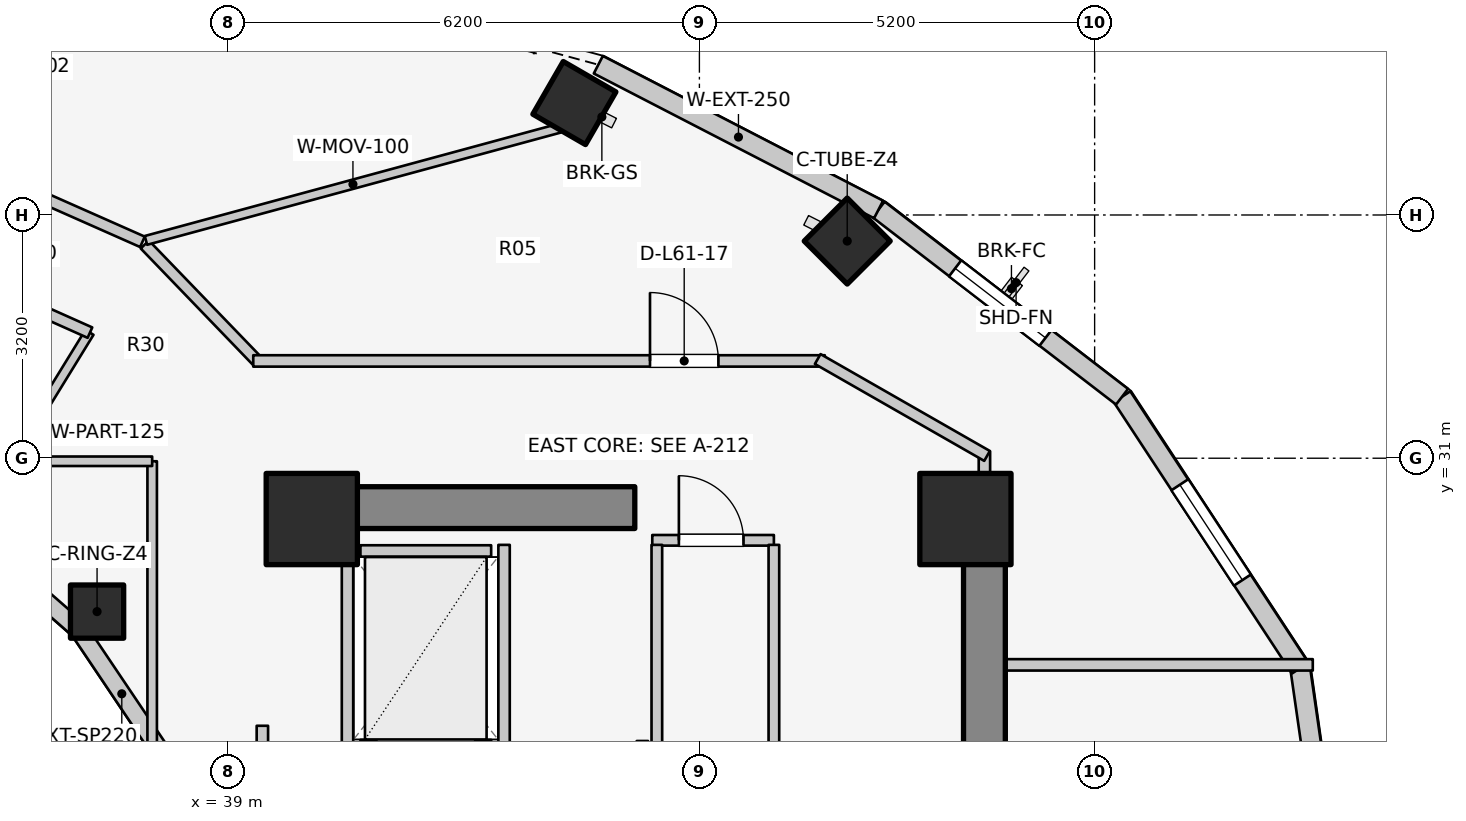
"""IFC4 building model, lengths in metres.
Left out: names, types, materials, properties, quantities, classifications, styles, units other than length and angle.
Written with IfcOpenShell. Run it as: python <this file> out.ifc"""

import sys

from ifc_helpers import new_model, si_unit, direction, frame, frame_2d, origin, origin_2d, place, context, subcontext, project, spatial, rectangle, extrude, element, fill, save


model = new_model("IFC4")
c1 = context("Model", 3, precision=1e-05, world=origin(), true_north=direction((0.0, 1.0)))
c2 = subcontext(c1, "Body", "Model", "MODEL_VIEW")
j1 = project(units=[si_unit("LENGTHUNIT", "METRE"), si_unit("PLANEANGLEUNIT", "RADIAN")], contexts=[c1])
p1 = place(None, origin())
s1 = spatial("IfcSite", under=j1, at=p1, CompositionType="ELEMENT")
p2 = place(p1, origin())
s2 = spatial("IfcBuilding", under=s1, at=p2, CompositionType="ELEMENT")
p3 = place(p2, frame((0.0, 0.0, 201.6)))
s3 = spatial("IfcBuildingStorey", under=s2, at=p3, CompositionType="ELEMENT", Elevation=201.6)
p4 = place(p3, frame((48.95, 17.05, 0.0), z_axis=(0.0, 0.0, 1.0), x_axis=(0.0, 1.0, 0.0)))
e1 = element("IfcWall", 1, at=p4, inside=s3, PredefinedType="SHEAR", context=c2, shape_type="SweptSolid", body=[
    extrude(rectangle(XDim=12.8, YDim=0.55, at=frame_2d((6.4, 0.0))), origin(), (0.0, 0.0, 1.0), 3.1),
])
p5 = place(p3, frame((39.85, 30.35, 0.0), z_axis=(0.0, 0.0, 1.0), x_axis=(1.0, 0.0, 0.0)))
e2 = element("IfcWall", 2, at=p5, inside=s3, PredefinedType="SHEAR", context=c2, shape_type="SweptSolid", body=[
    extrude(rectangle(XDim=4.5, YDim=0.55, at=frame_2d((2.25, 0.0))), origin(), (0.0, 0.0, 1.0), 3.1),
])
for number, where, z_axis, x_axis in (
    (3, (48.7, 30.2, 0.0), (0.0, 0.0, 1.0), (1.0, 0.0, 0.0)),
    (4, (40.1, 30.2, 0.0), (0.0, 0.0, 1.0), (1.0, 0.0, 0.0)),
):
    element("IfcColumn", number, at=place(p3, frame(where, z_axis=z_axis, x_axis=x_axis)), inside=s3, PredefinedType="COLUMN", context=c2, shape_type="SweptSolid", body=[
        extrude(rectangle(XDim=1.2, YDim=1.2, at=origin_2d()), origin(), (0.0, 0.0, 1.0), 3.1),
    ])
p6 = place(p3, frame((37.275, 28.982, 0.0), z_axis=(0.0, 0.0, 1.0), x_axis=(1.0, 0.0, 0.0)))
e5 = element("IfcColumn", 5, at=p6, inside=s3, PredefinedType="COLUMN", context=c2, shape_type="SweptSolid", body=[
    extrude(rectangle(XDim=0.7, YDim=0.7, at=origin_2d()), origin(), (0.0, 0.0, 1.0), 3.1),
])
for number, where, z_axis, x_axis in (
    (6, (47.145, 33.857, 0.0), (0.0, 0.0, 1.0), (0.707, 0.707, 0.0)),
    (7, (43.555, 35.673, 0.0), (0.0, 0.0, 1.0), (0.5, 0.866, 0.0)),
):
    element("IfcColumn", number, at=place(p3, frame(where, z_axis=z_axis, x_axis=x_axis)), inside=s3, PredefinedType="COLUMN", context=c2, shape_type="SweptSolid", body=[
        extrude(rectangle(XDim=0.8, YDim=0.8, at=origin_2d()), origin(), (0.0, 0.0, 1.0), 3.1),
    ])
p7 = place(p3, frame((38.166, 27.06, 0.0), z_axis=(0.0, 0.0, 1.0), x_axis=(-0.558197800898, 0.829707909492, 0.0)))
e8 = element("IfcWall", 8, at=p7, inside=s3, PredefinedType="STANDARD", context=c2, shape_type="SweptSolid", body=[
    extrude(rectangle(XDim=2.027, YDim=0.23, at=frame_2d((1.013, 0.0))), origin(), (0.0, 0.0, 1.0), 2.16),
])
p8 = place(p3, frame((37.035, 28.742, 0.0), z_axis=(0.0, 0.0, 1.0), x_axis=(-0.752576694707, 0.658504607869, 0.0)))
e9 = element("IfcWall", 9, at=p8, inside=s3, PredefinedType="STANDARD", context=c2, shape_type="SweptSolid", body=[
    extrude(rectangle(XDim=1.959, YDim=0.23, at=frame_2d((0.98, 0.0))), origin(), (0.0, 0.0, 1.0), 2.16),
])
p9 = place(p3, frame((53.86, 23.0, 0.0), z_axis=(0.0, 0.0, 1.0), x_axis=(-0.142712754019, 0.989764148593, 0.0)))
e10 = element("IfcWall", 10, at=p9, inside=s3, PredefinedType="STANDARD", context=c2, shape_type="SweptSolid", body=[
    extrude(rectangle(XDim=5.293, YDim=0.26, at=frame_2d((2.646, 0.0))), origin(), (0.0, 0.0, 1.0), 2.85),
])
p10 = place(p9, frame((1.896, 0.0, 0.75)))
e11 = element("IfcOpeningElement", 11, at=p10, cuts=e10, PredefinedType="OPENING", context=c2, shape_type="SweptSolid", body=[
    extrude(rectangle(XDim=1.5, YDim=1.6, at=frame_2d((0.75, 0.8))), frame((0.0, 0.14, 0.0), z_axis=(0.0, -1.0, 0.0), x_axis=(1.0, 0.0, 0.0)), (0.0, 0.0, 1.0), 0.28),
])
p11 = place(p3, frame((53.105, 28.239, 0.0), z_axis=(0.0, 0.0, 1.0), x_axis=(-0.548776305075, 0.835969238064, 0.0)))
e12 = element("IfcWall", 12, at=p11, inside=s3, PredefinedType="STANDARD", context=c2, shape_type="SweptSolid", body=[
    extrude(rectangle(XDim=4.271, YDim=0.26, at=frame_2d((2.135, 0.0))), origin(), (0.0, 0.0, 1.0), 2.85),
])
p12 = place(p11, frame((1.385, 0.0, 0.75)))
e13 = element("IfcOpeningElement", 13, at=p12, cuts=e12, PredefinedType="OPENING", context=c2, shape_type="SweptSolid", body=[
    extrude(rectangle(XDim=1.5, YDim=1.6, at=frame_2d((0.75, 0.8))), frame((0.0, 0.14, 0.0), z_axis=(0.0, -1.0, 0.0), x_axis=(1.0, 0.0, 0.0)), (0.0, 0.0, 1.0), 0.28),
])
p13 = place(p3, frame((50.761, 31.809, 0.0), z_axis=(0.0, 0.0, 1.0), x_axis=(-0.792713817907, 0.609593965603, 0.0)))
e14 = element("IfcWall", 14, at=p13, inside=s3, PredefinedType="STANDARD", context=c2, shape_type="SweptSolid", body=[
    extrude(rectangle(XDim=4.041, YDim=0.26, at=frame_2d((2.021, 0.0))), origin(), (0.0, 0.0, 1.0), 2.85),
])
p14 = place(p13, frame((1.271, 0.0, 0.75)))
e15 = element("IfcOpeningElement", 15, at=p14, cuts=e14, PredefinedType="OPENING", context=c2, shape_type="SweptSolid", body=[
    extrude(rectangle(XDim=1.5, YDim=1.6, at=frame_2d((0.75, 0.8))), frame((0.0, 0.14, 0.0), z_axis=(0.0, -1.0, 0.0), x_axis=(1.0, 0.0, 0.0)), (0.0, 0.0, 1.0), 0.28),
])
p15 = place(p3, frame((47.558, 34.272, 0.0), z_axis=(0.0, 0.0, 1.0), x_axis=(-0.88849146803, 0.458893137057, 0.0)))
e16 = element("IfcWall", 16, at=p15, inside=s3, PredefinedType="STANDARD", context=c2, shape_type="SweptSolid", body=[
    extrude(rectangle(XDim=4.15, YDim=0.26, at=frame_2d((2.075, 0.0))), origin(), (0.0, 0.0, 1.0), 2.85),
])
p16 = place(p3, frame((40.74, 27.22, 0.0), z_axis=(0.0, 0.0, 1.0), x_axis=(1.0, 0.0, 0.0)))
e17 = element("IfcWall", 17, at=p16, inside=s3, PredefinedType="SOLIDWALL", context=c2, shape_type="SweptSolid", body=[
    extrude(rectangle(XDim=1.72, YDim=0.15, at=frame_2d((0.86, 0.0))), origin(), (0.0, 0.0, 1.0), 2.855),
])
p17 = place(p16, frame((0.21, 0.0, 0.0)))
e18 = element("IfcOpeningElement", 18, at=p17, cuts=e17, PredefinedType="OPENING", context=c2, shape_type="SweptSolid", body=[
    extrude(rectangle(XDim=1.3, YDim=2.1, at=frame_2d((0.65, 1.05))), frame((0.0, 0.085, 0.0), z_axis=(0.0, -1.0, 0.0), x_axis=(1.0, 0.0, 0.0)), (0.0, 0.0, 1.0), 0.17),
])
p18 = place(p3, frame((40.74, 29.78, 0.0), z_axis=(0.0, 0.0, 1.0), x_axis=(1.0, 0.0, 0.0)))
e19 = element("IfcWall", 19, at=p18, inside=s3, PredefinedType="SOLIDWALL", context=c2, shape_type="SweptSolid", body=[
    extrude(rectangle(XDim=1.72, YDim=0.15, at=frame_2d((0.86, 0.0))), origin(), (0.0, 0.0, 1.0), 2.855),
])
for number, where, z_axis, x_axis in (
    (20, (40.57, 27.14, 0.0), (0.0, 0.0, 1.0), (0.0, 1.0, 0.0)),
    (21, (42.63, 27.14, 0.0), (0.0, 0.0, 1.0), (0.0, 1.0, 0.0)),
):
    element("IfcWall", number, at=place(p3, frame(where, z_axis=z_axis, x_axis=x_axis)), inside=s3, PredefinedType="SOLIDWALL", context=c2, shape_type="SweptSolid", body=[
        extrude(rectangle(XDim=2.72, YDim=0.15, at=frame_2d((1.36, 0.0))), origin(), (0.0, 0.0, 1.0), 2.855),
    ])
p19 = place(p3, frame((39.45, 24.08, 0.0), z_axis=(0.0, 0.0, 1.0), x_axis=(0.0, 1.0, 0.0)))
e22 = element("IfcWall", 22, at=p19, inside=s3, PredefinedType="PARTITIONING", context=c2, shape_type="SweptSolid", body=[
    extrude(rectangle(XDim=3.4, YDim=0.15, at=frame_2d((1.7, 0.0))), origin(), (0.0, 0.0, 1.0), 2.855),
])
p20 = place(p19, frame((2.02, 0.0, 0.0)))
e23 = element("IfcOpeningElement", 23, at=p20, cuts=e22, PredefinedType="OPENING", context=c2, shape_type="SweptSolid", body=[
    extrude(rectangle(XDim=1.1, YDim=2.1, at=frame_2d((0.55, 1.05))), frame((0.0, 0.085, 0.0), z_axis=(0.0, -1.0, 0.0), x_axis=(1.0, 0.0, 0.0)), (0.0, 0.0, 1.0), 0.17),
])
p21 = place(p3, frame((44.58, 29.92, 0.0), z_axis=(0.0, 0.0, 1.0), x_axis=(1.0, 0.0, 0.0)))
e24 = element("IfcWall", 24, at=p21, inside=s3, PredefinedType="PLUMBINGWALL", context=c2, shape_type="SweptSolid", body=[
    extrude(rectangle(XDim=1.6, YDim=0.14, at=frame_2d((0.8, 0.0))), origin(), (0.0, 0.0, 1.0), 2.855),
])
p22 = place(p21, frame((0.35, 0.0, 0.0)))
e25 = element("IfcOpeningElement", 25, at=p22, cuts=e24, PredefinedType="OPENING", context=c2, shape_type="SweptSolid", body=[
    extrude(rectangle(XDim=0.85, YDim=2.05, at=frame_2d((0.425, 1.025))), frame((0.0, 0.08, 0.0), z_axis=(0.0, -1.0, 0.0), x_axis=(1.0, 0.0, 0.0)), (0.0, 0.0, 1.0), 0.16),
])
for number, where, z_axis, x_axis in (
    (26, (44.64, 25.98, 0.0), (0.0, 0.0, 1.0), (0.0, 1.0, 0.0)),
    (27, (46.18, 25.98, 0.0), (0.0, 0.0, 1.0), (0.0, 1.0, 0.0)),
):
    element("IfcWall", number, at=place(p3, frame(where, z_axis=z_axis, x_axis=x_axis)), inside=s3, PredefinedType="PLUMBINGWALL", context=c2, shape_type="SweptSolid", body=[
        extrude(rectangle(XDim=3.88, YDim=0.14, at=frame_2d((1.94, 0.0))), origin(), (0.0, 0.0, 1.0), 2.855),
    ])
p23 = place(p3, frame((35.55, 30.015, 0.0), z_axis=(0.0, 0.0, 1.0), x_axis=(0.523992004803, 0.851723182086, 0.0)))
e28 = element("IfcWall", 28, at=p23, inside=s3, PredefinedType="PARTITIONING", context=c2, shape_type="SweptSolid", body=[
    extrude(rectangle(XDim=3.101, YDim=0.125, at=frame_2d((1.551, 0.0))), origin(), (0.0, 0.0, 1.0), 2.376),
])
p24 = place(p3, frame((37.181, 32.652, 0.0), z_axis=(0.0, 0.0, 1.0), x_axis=(-0.913120130558, 0.407690602257, 0.0)))
e29 = element("IfcWall", 29, at=p24, inside=s3, PredefinedType="PARTITIONING", context=c2, shape_type="SweptSolid", body=[
    extrude(rectangle(XDim=2.743, YDim=0.15, at=frame_2d((1.371, 0.0))), origin(), (0.0, 0.0, 1.0), 2.376),
])
p25 = place(p3, frame((38.0, 25.8, 0.0), z_axis=(0.0, 0.0, 1.0), x_axis=(0.0, 1.0, 0.0)))
e30 = element("IfcWall", 30, at=p25, inside=s3, PredefinedType="PARTITIONING", context=c2, shape_type="SweptSolid", body=[
    extrude(rectangle(XDim=5.16, YDim=0.125, at=frame_2d((2.58, 0.0))), origin(), (0.0, 0.0, 1.0), 2.232),
])
p26 = place(p3, frame((35.4, 30.96, 0.0), z_axis=(0.0, 0.0, 1.0), x_axis=(1.0, 0.0, 0.0)))
e31 = element("IfcWall", 31, at=p26, inside=s3, PredefinedType="PARTITIONING", context=c2, shape_type="SweptSolid", body=[
    extrude(rectangle(XDim=2.6, YDim=0.125, at=frame_2d((1.3, 0.0))), origin(), (0.0, 0.0, 1.0), 2.376),
])
p27 = place(p3, frame((48.95, 28.281, 0.0), z_axis=(0.0, 0.0, 1.0), x_axis=(1.0, 0.0, 0.0)))
e32 = element("IfcWall", 32, at=p27, inside=s3, PredefinedType="PARTITIONING", context=c2, shape_type="SweptSolid", body=[
    extrude(rectangle(XDim=4.32, YDim=0.15, at=frame_2d((2.16, 0.0))), origin(), (0.0, 0.0, 1.0), 2.855),
])
p28 = place(p3, frame((48.95, 29.8, 0.0), z_axis=(0.0, 0.0, 1.0), x_axis=(0.0, 1.0, 0.0)))
e33 = element("IfcWall", 33, at=p28, inside=s3, PredefinedType="PARTITIONING", context=c2, shape_type="SweptSolid", body=[
    extrude(rectangle(XDim=1.29, YDim=0.15, at=frame_2d((0.645, 0.0))), origin(), (0.0, 0.0, 1.0), 2.855),
])
p29 = place(p3, frame((37.903, 33.812, 0.0), z_axis=(0.0, 0.0, 1.0), x_axis=(0.694032962553, -0.719943224768, 0.0)))
e34 = element("IfcWall", 34, at=p29, inside=s3, PredefinedType="PARTITIONING", context=c2, shape_type="SweptSolid", body=[
    extrude(rectangle(XDim=2.158, YDim=0.15, at=frame_2d((1.079, 0.0))), origin(), (0.0, 0.0, 1.0), 2.376),
])
p30 = place(p3, frame((39.33, 32.28, 0.0), z_axis=(0.0, 0.0, 1.0), x_axis=(1.0, 0.0, 0.0)))
e35 = element("IfcWall", 35, at=p30, inside=s3, PredefinedType="PARTITIONING", context=c2, shape_type="SweptSolid", body=[
    extrude(rectangle(XDim=7.52, YDim=0.15, at=frame_2d((3.76, 0.0))), origin(), (0.0, 0.0, 1.0), 2.376),
])
p31 = place(p30, frame((5.22, 0.0, 0.0)))
e36 = element("IfcOpeningElement", 36, at=p31, cuts=e35, PredefinedType="OPENING", context=c2, shape_type="SweptSolid", body=[
    extrude(rectangle(XDim=0.9, YDim=2.1, at=frame_2d((0.45, 1.05))), frame((0.0, 0.085, 0.0), z_axis=(0.0, -1.0, 0.0), x_axis=(1.0, 0.0, 0.0)), (0.0, 0.0, 1.0), 0.17),
])
p32 = place(p3, frame((46.757, 32.305, 0.0), z_axis=(0.0, 0.0, 1.0), x_axis=(0.867991349648, -0.496579315857, 0.0)))
e37 = element("IfcWall", 37, at=p32, inside=s3, PredefinedType="PARTITIONING", context=c2, shape_type="SweptSolid", body=[
    extrude(rectangle(XDim=2.567, YDim=0.15, at=frame_2d((1.283, 0.0))), origin(), (0.0, 0.0, 1.0), 2.22),
])
p33 = place(p3, frame((37.918, 33.866, 0.0), z_axis=(0.0, 0.0, 1.0), x_axis=(0.965109390289, 0.261847025523, 0.0)))
e38 = element("IfcWall", 38, at=p33, inside=s3, PredefinedType="MOVABLE", context=c2, shape_type="SweptSolid", body=[
    extrude(rectangle(XDim=5.644, YDim=0.12, at=frame_2d((2.822, 0.0))), origin(), (0.0, 0.0, 1.0), 2.376),
])
p34 = place(p3, frame((37.872, 33.847, 0.0), z_axis=(0.0, 0.0, 1.0), x_axis=(-0.914384748819, 0.404846305563, 0.0)))
e39 = element("IfcWall", 39, at=p34, inside=s3, PredefinedType="PARTITIONING", context=c2, shape_type="SweptSolid", body=[
    extrude(rectangle(XDim=3.104, YDim=0.15, at=frame_2d((1.552, 0.0))), origin(), (0.0, 0.0, 1.0), 2.376),
])
p35 = place(p12, origin())
e40 = element("IfcWindow", 40, at=p35, inside=s3, PartitioningType="SINGLE_PANEL", PredefinedType="WINDOW", context=c2, shape_type="SweptSolid", body=[
    extrude(rectangle(XDim=1.5, YDim=1.6, at=frame_2d((0.75, 0.8))), frame((0.0, 0.03, 0.0), z_axis=(0.0, -1.0, 0.0), x_axis=(1.0, 0.0, 0.0)), (0.0, 0.0, 1.0), 0.06),
])
fill(e13, e40)
p36 = place(p14, origin())
e41 = element("IfcWindow", 41, at=p36, inside=s3, PartitioningType="SINGLE_PANEL", PredefinedType="WINDOW", context=c2, shape_type="SweptSolid", body=[
    extrude(rectangle(XDim=1.5, YDim=1.6, at=frame_2d((0.75, 0.8))), frame((0.0, 0.03, 0.0), z_axis=(0.0, -1.0, 0.0), x_axis=(1.0, 0.0, 0.0)), (0.0, 0.0, 1.0), 0.06),
])
fill(e15, e41)
p37 = place(p22, origin())
e42 = element("IfcDoor", 42, at=p37, inside=s3, OperationType="SINGLE_SWING_LEFT", PredefinedType="DOOR", context=c2, shape_type="SweptSolid", body=[
    extrude(rectangle(XDim=0.85, YDim=2.05, at=frame_2d((0.425, 1.025))), frame((0.0, 0.025, 0.0), z_axis=(0.0, -1.0, 0.0), x_axis=(1.0, 0.0, 0.0)), (0.0, 0.0, 1.0), 0.05),
])
fill(e25, e42)
p38 = place(p31, origin())
e43 = element("IfcDoor", 43, at=p38, inside=s3, OperationType="SINGLE_SWING_LEFT", PredefinedType="DOOR", context=c2, shape_type="SweptSolid", body=[
    extrude(rectangle(XDim=0.9, YDim=2.1, at=frame_2d((0.45, 1.05))), frame((0.0, 0.025, 0.0), z_axis=(0.0, -1.0, 0.0), x_axis=(1.0, 0.0, 0.0)), (0.0, 0.0, 1.0), 0.05),
])
fill(e36, e43)
save(model, sys.argv[1])
